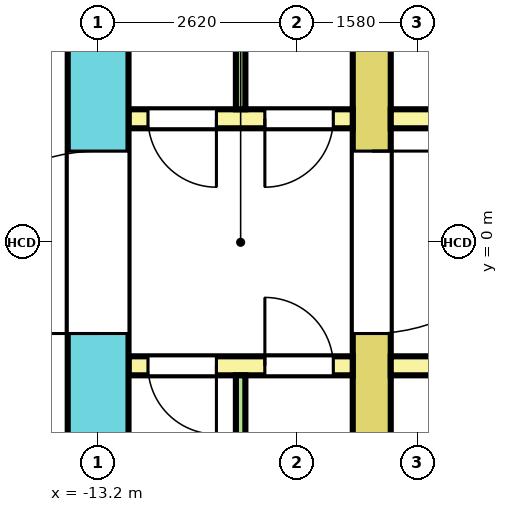
"""IFC4 building model, lengths in metres.
Left out: names, types, materials, properties, quantities, classifications, styles, units other than length and angle.
Written with IfcOpenShell. Run it as: python <this file> out.ifc"""

import sys

from ifc_helpers import new_model, si_unit, direction, frame, frame_2d, origin, place, context, subcontext, project, spatial, rectangle, extrude, element, fill, save


model = new_model("IFC4")
c1 = context("Model", 3, precision=1e-05, world=origin(), true_north=direction((0.0, 1.0)))
c2 = subcontext(c1, "Body", "Model", "MODEL_VIEW")
j1 = project(units=[si_unit("LENGTHUNIT", "METRE"), si_unit("PLANEANGLEUNIT", "RADIAN")], contexts=[c1])
p1 = place(None, origin())
s1 = spatial("IfcSite", under=j1, at=p1, CompositionType="ELEMENT")
p2 = place(p1, origin())
s2 = spatial("IfcBuilding", under=s1, at=p2, CompositionType="ELEMENT")
p3 = place(p2, frame((0.0, 0.0, 113.2)))
s3 = spatial("IfcBuildingStorey", under=s2, at=p3, CompositionType="ELEMENT", Elevation=113.2)
p4 = place(p3, frame((-13.2, -10.4, 0.0), z_axis=(0.0, 0.0, 1.0), x_axis=(0.0, 1.0, 0.0)))
e1 = element("IfcWall", 1, at=p4, inside=s3, PredefinedType="SHEAR", context=c2, shape_type="SweptSolid", body=[
    extrude(rectangle(XDim=20.8, YDim=0.8, at=frame_2d((10.4, 0.0))), origin(), (0.0, 0.0, 1.0), 4.1),
])
p5 = place(p4, frame((9.2, 0.0, 0.0)))
e2 = element("IfcOpeningElement", 2, at=p5, cuts=e1, PredefinedType="OPENING", context=c2, shape_type="SweptSolid", body=[
    extrude(rectangle(XDim=2.4, YDim=2.1, at=frame_2d((1.2, 1.05))), frame((0.0, 0.41, 0.0), z_axis=(0.0, -1.0, 0.0), x_axis=(1.0, 0.0, 0.0)), (0.0, 0.0, 1.0), 0.82),
])
p6 = place(p4, frame((16.1, 0.0, 0.0)))
e3 = element("IfcOpeningElement", 3, at=p6, cuts=e1, PredefinedType="OPENING", context=c2, shape_type="SweptSolid", body=[
    extrude(rectangle(XDim=1.2, YDim=2.1, at=frame_2d((0.6, 1.05))), frame((0.0, 0.41, 0.0), z_axis=(0.0, -1.0, 0.0), x_axis=(1.0, 0.0, 0.0)), (0.0, 0.0, 1.0), 0.82),
])
p7 = place(p4, frame((3.5, 0.0, 0.0)))
e4 = element("IfcOpeningElement", 4, at=p7, cuts=e1, PredefinedType="OPENING", context=c2, shape_type="SweptSolid", body=[
    extrude(rectangle(XDim=1.2, YDim=2.1, at=frame_2d((0.6, 1.05))), frame((0.0, 0.41, 0.0), z_axis=(0.0, -1.0, 0.0), x_axis=(1.0, 0.0, 0.0)), (0.0, 0.0, 1.0), 0.82),
])
p8 = place(p3, frame((-9.6, -7.7, 0.0), z_axis=(0.0, 0.0, 1.0), x_axis=(0.0, 1.0, 0.0)))
e5 = element("IfcWall", 5, at=p8, inside=s3, PredefinedType="SHEAR", context=c2, shape_type="SweptSolid", body=[
    extrude(rectangle(XDim=15.4, YDim=0.5, at=frame_2d((7.7, 0.0))), origin(), (0.0, 0.0, 1.0), 4.1),
])
p9 = place(p8, frame((6.5, 0.0, 0.0)))
e6 = element("IfcOpeningElement", 6, at=p9, cuts=e5, PredefinedType="OPENING", context=c2, shape_type="SweptSolid", body=[
    extrude(rectangle(XDim=2.4, YDim=2.1, at=frame_2d((1.2, 1.05))), frame((0.0, 0.26, 0.0), z_axis=(0.0, -1.0, 0.0), x_axis=(1.0, 0.0, 0.0)), (0.0, 0.0, 1.0), 0.52),
])
p10 = place(p8, frame((13.4, 0.0, 0.0)))
e7 = element("IfcOpeningElement", 7, at=p10, cuts=e5, PredefinedType="OPENING", context=c2, shape_type="SweptSolid", body=[
    extrude(rectangle(XDim=1.2, YDim=2.1, at=frame_2d((0.6, 1.05))), frame((0.0, 0.26, 0.0), z_axis=(0.0, -1.0, 0.0), x_axis=(1.0, 0.0, 0.0)), (0.0, 0.0, 1.0), 0.52),
])
p11 = place(p8, frame((0.8, 0.0, 0.0)))
e8 = element("IfcOpeningElement", 8, at=p11, cuts=e5, PredefinedType="OPENING", context=c2, shape_type="SweptSolid", body=[
    extrude(rectangle(XDim=1.2, YDim=2.1, at=frame_2d((0.6, 1.05))), frame((0.0, 0.26, 0.0), z_axis=(0.0, -1.0, 0.0), x_axis=(1.0, 0.0, 0.0)), (0.0, 0.0, 1.0), 0.52),
])
p12 = place(p3, frame((-12.8, 1.625, 0.0), z_axis=(0.0, 0.0, 1.0), x_axis=(1.0, 0.0, 0.0)))
e9 = element("IfcWall", 9, at=p12, inside=s3, PredefinedType="SOLIDWALL", context=c2, shape_type="SweptSolid", body=[
    extrude(rectangle(XDim=2.95, YDim=0.25, at=frame_2d((1.475, 0.0))), origin(), (0.0, 0.0, 1.0), 4.1),
])
p13 = place(p12, frame((0.256, 0.0, 0.0)))
e10 = element("IfcOpeningElement", 10, at=p13, cuts=e9, PredefinedType="OPENING", context=c2, shape_type="SweptSolid", body=[
    extrude(rectangle(XDim=0.9, YDim=2.1, at=frame_2d((0.45, 1.05))), frame((0.0, 0.135, 0.0), z_axis=(0.0, -1.0, 0.0), x_axis=(1.0, 0.0, 0.0)), (0.0, 0.0, 1.0), 0.27),
])
p14 = place(p12, frame((1.794, 0.0, 0.0)))
e11 = element("IfcOpeningElement", 11, at=p14, cuts=e9, PredefinedType="OPENING", context=c2, shape_type="SweptSolid", body=[
    extrude(rectangle(XDim=0.9, YDim=2.1, at=frame_2d((0.45, 1.05))), frame((0.0, 0.135, 0.0), z_axis=(0.0, -1.0, 0.0), x_axis=(1.0, 0.0, 0.0)), (0.0, 0.0, 1.0), 0.27),
])
p15 = place(p3, frame((-9.35, 1.625, 0.0), z_axis=(0.0, 0.0, 1.0), x_axis=(1.0, 0.0, 0.0)))
e12 = element("IfcWall", 12, at=p15, inside=s3, PredefinedType="SOLIDWALL", context=c2, shape_type="SweptSolid", body=[
    extrude(rectangle(XDim=18.7, YDim=0.25, at=frame_2d((9.35, 0.0))), origin(), (0.0, 0.0, 1.0), 4.1),
])
p16 = place(p15, frame((2.85, 0.0, 0.0)))
e13 = element("IfcOpeningElement", 13, at=p16, cuts=e12, PredefinedType="OPENING", context=c2, shape_type="SweptSolid", body=[
    extrude(rectangle(XDim=1.1, YDim=2.1, at=frame_2d((0.55, 1.05))), frame((0.0, 0.135, 0.0), z_axis=(0.0, -1.0, 0.0), x_axis=(1.0, 0.0, 0.0)), (0.0, 0.0, 1.0), 0.27),
])
p17 = place(p15, frame((5.15, 0.0, 0.0)))
e14 = element("IfcOpeningElement", 14, at=p17, cuts=e12, PredefinedType="OPENING", context=c2, shape_type="SweptSolid", body=[
    extrude(rectangle(XDim=1.1, YDim=2.1, at=frame_2d((0.55, 1.05))), frame((0.0, 0.135, 0.0), z_axis=(0.0, -1.0, 0.0), x_axis=(1.0, 0.0, 0.0)), (0.0, 0.0, 1.0), 0.27),
])
p18 = place(p15, frame((14.8, 0.0, 0.0)))
e15 = element("IfcOpeningElement", 15, at=p18, cuts=e12, PredefinedType="OPENING", context=c2, shape_type="SweptSolid", body=[
    extrude(rectangle(XDim=1.1, YDim=2.1, at=frame_2d((0.55, 1.05))), frame((0.0, 0.135, 0.0), z_axis=(0.0, -1.0, 0.0), x_axis=(1.0, 0.0, 0.0)), (0.0, 0.0, 1.0), 0.27),
])
p19 = place(p15, frame((0.575, 0.0, 0.0)))
e16 = element("IfcOpeningElement", 16, at=p19, cuts=e12, PredefinedType="OPENING", context=c2, shape_type="SweptSolid", body=[
    extrude(rectangle(XDim=0.9, YDim=2.1, at=frame_2d((0.45, 1.05))), frame((0.0, 0.135, 0.0), z_axis=(0.0, -1.0, 0.0), x_axis=(1.0, 0.0, 0.0)), (0.0, 0.0, 1.0), 0.27),
])
p20 = place(p15, frame((17.225, 0.0, 0.0)))
e17 = element("IfcOpeningElement", 17, at=p20, cuts=e12, PredefinedType="OPENING", context=c2, shape_type="SweptSolid", body=[
    extrude(rectangle(XDim=0.9, YDim=2.1, at=frame_2d((0.45, 1.05))), frame((0.0, 0.135, 0.0), z_axis=(0.0, -1.0, 0.0), x_axis=(1.0, 0.0, 0.0)), (0.0, 0.0, 1.0), 0.27),
])
p21 = place(p3, frame((-12.8, -1.625, 0.0), z_axis=(0.0, 0.0, 1.0), x_axis=(1.0, 0.0, 0.0)))
e18 = element("IfcWall", 18, at=p21, inside=s3, PredefinedType="SOLIDWALL", context=c2, shape_type="SweptSolid", body=[
    extrude(rectangle(XDim=2.95, YDim=0.25, at=frame_2d((1.475, 0.0))), origin(), (0.0, 0.0, 1.0), 4.1),
])
p22 = place(p21, frame((0.256, 0.0, 0.0)))
e19 = element("IfcOpeningElement", 19, at=p22, cuts=e18, PredefinedType="OPENING", context=c2, shape_type="SweptSolid", body=[
    extrude(rectangle(XDim=0.9, YDim=2.1, at=frame_2d((0.45, 1.05))), frame((0.0, 0.135, 0.0), z_axis=(0.0, -1.0, 0.0), x_axis=(1.0, 0.0, 0.0)), (0.0, 0.0, 1.0), 0.27),
])
p23 = place(p21, frame((1.794, 0.0, 0.0)))
e20 = element("IfcOpeningElement", 20, at=p23, cuts=e18, PredefinedType="OPENING", context=c2, shape_type="SweptSolid", body=[
    extrude(rectangle(XDim=0.9, YDim=2.1, at=frame_2d((0.45, 1.05))), frame((0.0, 0.135, 0.0), z_axis=(0.0, -1.0, 0.0), x_axis=(1.0, 0.0, 0.0)), (0.0, 0.0, 1.0), 0.27),
])
p24 = place(p3, frame((-9.35, -1.625, 0.0), z_axis=(0.0, 0.0, 1.0), x_axis=(1.0, 0.0, 0.0)))
e21 = element("IfcWall", 21, at=p24, inside=s3, PredefinedType="SOLIDWALL", context=c2, shape_type="SweptSolid", body=[
    extrude(rectangle(XDim=18.7, YDim=0.25, at=frame_2d((9.35, 0.0))), origin(), (0.0, 0.0, 1.0), 4.1),
])
p25 = place(p24, frame((2.85, 0.0, 0.0)))
e22 = element("IfcOpeningElement", 22, at=p25, cuts=e21, PredefinedType="OPENING", context=c2, shape_type="SweptSolid", body=[
    extrude(rectangle(XDim=1.1, YDim=2.1, at=frame_2d((0.55, 1.05))), frame((0.0, 0.135, 0.0), z_axis=(0.0, -1.0, 0.0), x_axis=(1.0, 0.0, 0.0)), (0.0, 0.0, 1.0), 0.27),
])
p26 = place(p24, frame((5.15, 0.0, 0.0)))
e23 = element("IfcOpeningElement", 23, at=p26, cuts=e21, PredefinedType="OPENING", context=c2, shape_type="SweptSolid", body=[
    extrude(rectangle(XDim=1.1, YDim=2.1, at=frame_2d((0.55, 1.05))), frame((0.0, 0.135, 0.0), z_axis=(0.0, -1.0, 0.0), x_axis=(1.0, 0.0, 0.0)), (0.0, 0.0, 1.0), 0.27),
])
p27 = place(p24, frame((14.8, 0.0, 0.0)))
e24 = element("IfcOpeningElement", 24, at=p27, cuts=e21, PredefinedType="OPENING", context=c2, shape_type="SweptSolid", body=[
    extrude(rectangle(XDim=1.1, YDim=2.1, at=frame_2d((0.55, 1.05))), frame((0.0, 0.135, 0.0), z_axis=(0.0, -1.0, 0.0), x_axis=(1.0, 0.0, 0.0)), (0.0, 0.0, 1.0), 0.27),
])
p28 = place(p24, frame((0.575, 0.0, 0.0)))
e25 = element("IfcOpeningElement", 25, at=p28, cuts=e21, PredefinedType="OPENING", context=c2, shape_type="SweptSolid", body=[
    extrude(rectangle(XDim=0.9, YDim=2.1, at=frame_2d((0.45, 1.05))), frame((0.0, 0.135, 0.0), z_axis=(0.0, -1.0, 0.0), x_axis=(1.0, 0.0, 0.0)), (0.0, 0.0, 1.0), 0.27),
])
p29 = place(p24, frame((17.225, 0.0, 0.0)))
e26 = element("IfcOpeningElement", 26, at=p29, cuts=e21, PredefinedType="OPENING", context=c2, shape_type="SweptSolid", body=[
    extrude(rectangle(XDim=0.9, YDim=2.1, at=frame_2d((0.45, 1.05))), frame((0.0, 0.135, 0.0), z_axis=(0.0, -1.0, 0.0), x_axis=(1.0, 0.0, 0.0)), (0.0, 0.0, 1.0), 0.27),
])
for number, where, z_axis, x_axis in (
    (27, (-11.325, 1.75, 0.0), (0.0, 0.0, 1.0), (0.0, 1.0, 0.0)),
    (28, (-11.325, -4.65, 0.0), (0.0, 0.0, 1.0), (0.0, 1.0, 0.0)),
):
    element("IfcWall", number, at=place(p3, frame(where, z_axis=z_axis, x_axis=x_axis)), inside=s3, PredefinedType="PARTITIONING", context=c2, shape_type="SweptSolid", body=[
        extrude(rectangle(XDim=2.9, YDim=0.125, at=frame_2d((1.45, 0.0))), origin(), (0.0, 0.0, 1.0), 4.1),
    ])
p30 = place(p9, origin())
e29 = element("IfcDoor", 29, at=p30, inside=s3, OperationType="DOUBLE_DOOR_SINGLE_SWING", PredefinedType="DOOR", context=c2, shape_type="SweptSolid", body=[
    extrude(rectangle(XDim=2.4, YDim=2.1, at=frame_2d((1.2, 1.05))), frame((0.0, 0.2, 0.0), z_axis=(0.0, -1.0, 0.0), x_axis=(1.0, 0.0, 0.0)), (0.0, 0.0, 1.0), 0.4),
])
fill(e6, e29)
p31 = place(p5, origin())
e30 = element("IfcDoor", 30, at=p31, inside=s3, OperationType="DOUBLE_DOOR_SINGLE_SWING", PredefinedType="DOOR", context=c2, shape_type="SweptSolid", body=[
    extrude(rectangle(XDim=2.4, YDim=2.1, at=frame_2d((1.2, 1.05))), frame((0.0, 0.3, 0.0), z_axis=(0.0, -1.0, 0.0), x_axis=(1.0, 0.0, 0.0)), (0.0, 0.0, 1.0), 0.6),
])
fill(e2, e30)
p32 = place(p13, origin())
e31 = element("IfcDoor", 31, at=p32, inside=s3, OperationType="SINGLE_SWING_LEFT", PredefinedType="DOOR", context=c2, shape_type="SweptSolid", body=[
    extrude(rectangle(XDim=0.9, YDim=2.1, at=frame_2d((0.45, 1.05))), frame((0.0, 0.075, 0.0), z_axis=(0.0, -1.0, 0.0), x_axis=(1.0, 0.0, 0.0)), (0.0, 0.0, 1.0), 0.15),
])
fill(e10, e31)
p33 = place(p14, origin())
e32 = element("IfcDoor", 32, at=p33, inside=s3, OperationType="SINGLE_SWING_RIGHT", PredefinedType="DOOR", context=c2, shape_type="SweptSolid", body=[
    extrude(rectangle(XDim=0.9, YDim=2.1, at=frame_2d((0.45, 1.05))), frame((0.0, 0.075, 0.0), z_axis=(0.0, -1.0, 0.0), x_axis=(1.0, 0.0, 0.0)), (0.0, 0.0, 1.0), 0.15),
])
fill(e11, e32)
p34 = place(p22, origin())
e33 = element("IfcDoor", 33, at=p34, inside=s3, OperationType="SINGLE_SWING_LEFT", PredefinedType="DOOR", context=c2, shape_type="SweptSolid", body=[
    extrude(rectangle(XDim=0.9, YDim=2.1, at=frame_2d((0.45, 1.05))), frame((0.0, 0.075, 0.0), z_axis=(0.0, -1.0, 0.0), x_axis=(1.0, 0.0, 0.0)), (0.0, 0.0, 1.0), 0.15),
])
fill(e19, e33)
p35 = place(p23, origin())
e34 = element("IfcDoor", 34, at=p35, inside=s3, OperationType="SINGLE_SWING_RIGHT", PredefinedType="DOOR", context=c2, shape_type="SweptSolid", body=[
    extrude(rectangle(XDim=0.9, YDim=2.1, at=frame_2d((0.45, 1.05))), frame((0.0, 0.075, 0.0), z_axis=(0.0, -1.0, 0.0), x_axis=(1.0, 0.0, 0.0)), (0.0, 0.0, 1.0), 0.15),
])
fill(e20, e34)
save(model, sys.argv[1])
